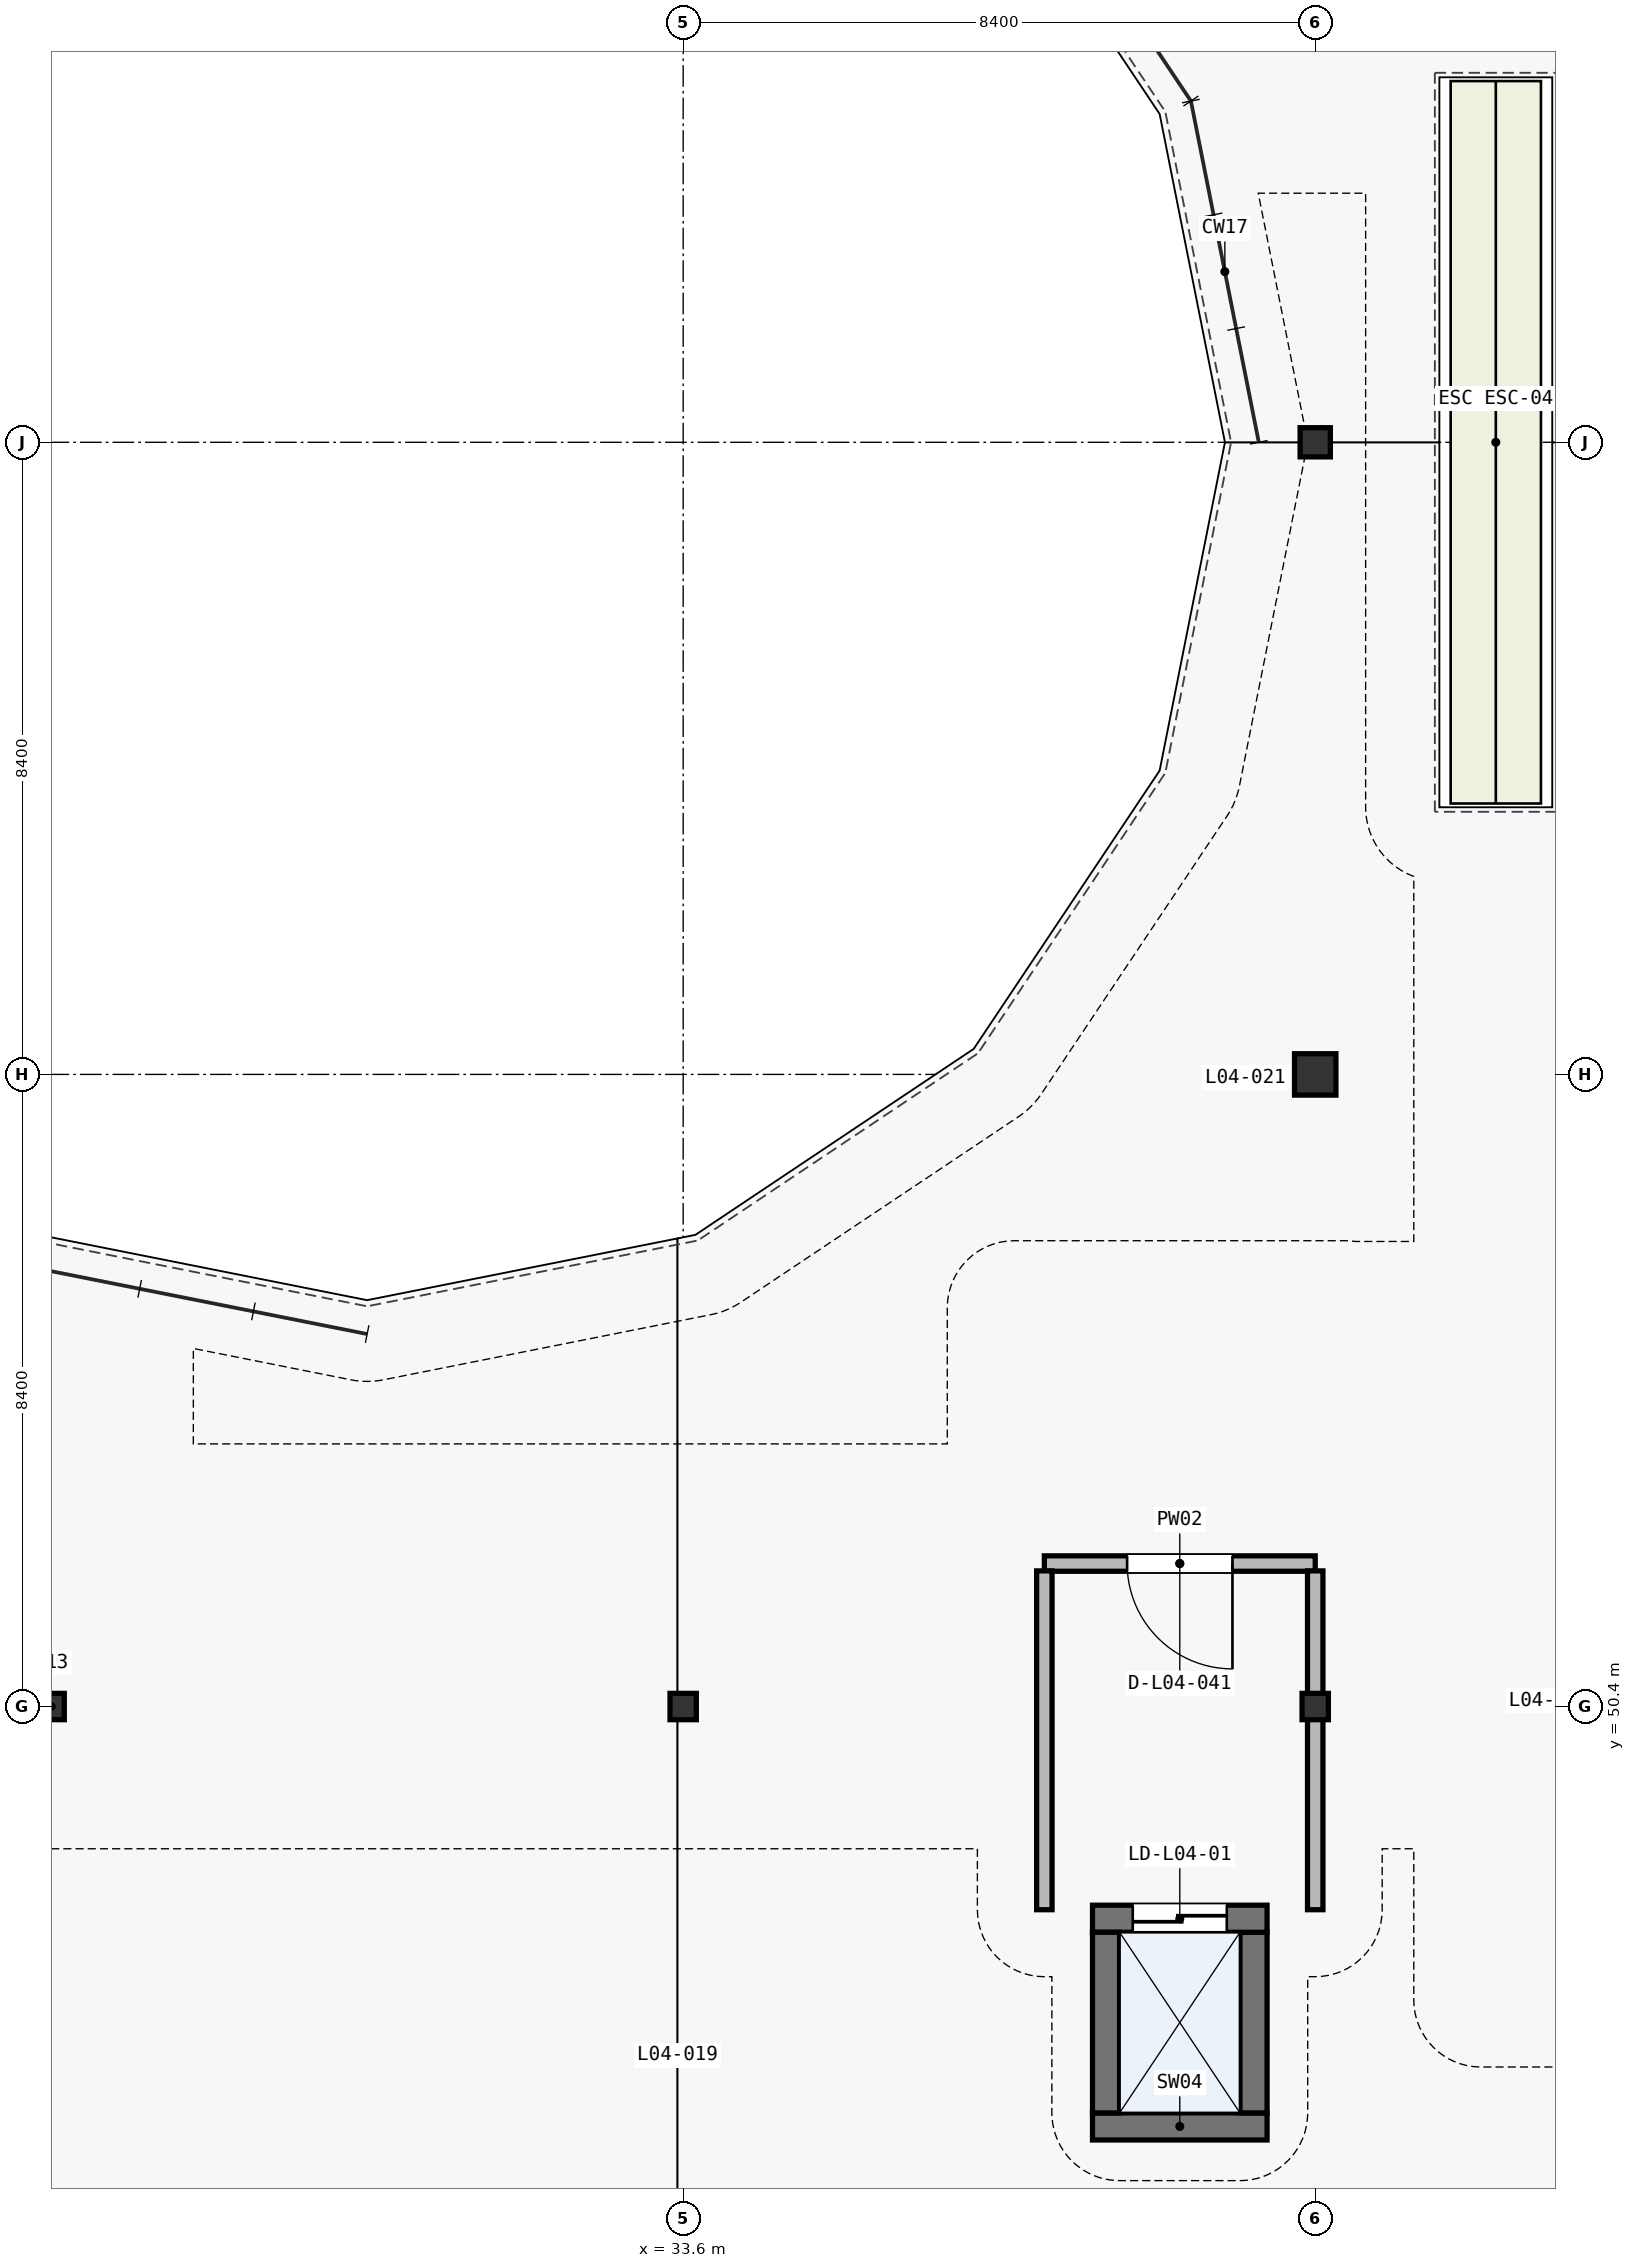
"""IFC4 building model, lengths in metres.
Left out: names, types, materials, properties, quantities, classifications, styles, units other than length and angle.
Written with IfcOpenShell. Run it as: python <this file> out.ifc"""

import sys

from ifc_helpers import new_model, si_unit, direction, frame, frame_2d, origin, origin_2d, place, context, subcontext, project, spatial, rectangle, hollow_rectangle, i_section, extrude, element, fill, save


model = new_model("IFC4")
c1 = context("Model", 3, precision=1e-05, world=origin(), true_north=direction((0.0, 1.0)))
c2 = subcontext(c1, "Body", "Model", "MODEL_VIEW")
j1 = project(units=[si_unit("LENGTHUNIT", "METRE"), si_unit("PLANEANGLEUNIT", "RADIAN")], contexts=[c1])
p1 = place(None, origin())
s1 = spatial("IfcSite", under=j1, at=p1, CompositionType="ELEMENT")
p2 = place(p1, origin())
s2 = spatial("IfcBuilding", under=s1, at=p2, CompositionType="ELEMENT")
p3 = place(p2, frame((0.0, 0.0, 16.5)))
s3 = spatial("IfcBuildingStorey", under=s2, at=p3, CompositionType="ELEMENT", Elevation=16.5)
for number, where, z_axis, x_axis in (
    (1, (25.2, 50.4, 0.0), (0.0, 0.0, 1.0), (1.0, 0.0, 0.0)),
    (2, (33.6, 50.4, 0.0), (0.0, 0.0, 1.0), (1.0, 0.0, 0.0)),
    (3, (42.0, 50.4, 0.0), (0.0, 0.0, 1.0), (1.0, 0.0, 0.0)),
):
    element("IfcColumn", number, at=place(p3, frame(where, z_axis=z_axis, x_axis=x_axis)), inside=s3, PredefinedType="COLUMN", context=c2, shape_type="SweptSolid", body=[
        extrude(i_section(OverallWidth=0.35, OverallDepth=0.35, WebThickness=0.012, FlangeThickness=0.019, FilletRadius=0.02, at=origin_2d()), origin(), (0.0, 0.0, 1.0), 5.1),
    ])
p4 = place(p3, frame((42.0, 58.8, 0.0), z_axis=(0.0, 0.0, 1.0), x_axis=(1.0, 0.0, 0.0)))
e4 = element("IfcColumn", 4, at=p4, inside=s3, PredefinedType="COLUMN", context=c2, shape_type="SweptSolid", body=[
    extrude(hollow_rectangle(XDim=0.55, YDim=0.55, WallThickness=0.022, at=origin_2d()), origin(), (0.0, 0.0, 1.0), 5.1),
])
p5 = place(p3, frame((42.0, 67.2, 0.0), z_axis=(0.0, 0.0, 1.0), x_axis=(1.0, 0.0, 0.0)))
e5 = element("IfcColumn", 5, at=p5, inside=s3, PredefinedType="COLUMN", context=c2, shape_type="SweptSolid", body=[
    extrude(i_section(OverallWidth=0.402, OverallDepth=0.388, WebThickness=0.015, FlangeThickness=0.015, FilletRadius=0.022, at=origin_2d()), origin(), (0.0, 0.0, 1.0), 5.1),
])
p6 = place(p3, frame((39.04, 44.82, 0.0), z_axis=(0.0, 0.0, 1.0), x_axis=(1.0, 0.0, 0.0)))
e6 = element("IfcWall", 6, at=p6, inside=s3, PredefinedType="SHEAR", context=c2, shape_type="SweptSolid", body=[
    extrude(rectangle(XDim=2.32, YDim=0.36, at=frame_2d((1.16, 0.0))), origin(), (0.0, 0.0, 1.0), 4.845),
])
p7 = place(p3, frame((41.18, 45.0, 0.0), z_axis=(0.0, 0.0, 1.0), x_axis=(0.0, 1.0, 0.0)))
e7 = element("IfcWall", 7, at=p7, inside=s3, PredefinedType="SHEAR", context=c2, shape_type="SweptSolid", body=[
    extrude(rectangle(XDim=2.4, YDim=0.36, at=frame_2d((1.2, 0.0))), origin(), (0.0, 0.0, 1.0), 4.845),
])
p8 = place(p3, frame((41.36, 47.58, 0.0), z_axis=(0.0, 0.0, 1.0), x_axis=(-1.0, 0.0, 0.0)))
e8 = element("IfcWall", 8, at=p8, inside=s3, PredefinedType="SHEAR", context=c2, shape_type="SweptSolid", body=[
    extrude(rectangle(XDim=2.32, YDim=0.36, at=frame_2d((1.16, 0.0))), origin(), (0.0, 0.0, 1.0), 4.845),
])
p9 = place(p8, frame((0.535, 0.0, 0.0)))
e9 = element("IfcOpeningElement", 9, at=p9, cuts=e8, PredefinedType="OPENING", context=c2, shape_type="SweptSolid", body=[
    extrude(rectangle(XDim=1.25, YDim=2.2, at=frame_2d((0.625, 1.1))), frame((0.0, 0.19, 0.0), z_axis=(0.0, -1.0, 0.0), x_axis=(1.0, 0.0, 0.0)), (0.0, 0.0, 1.0), 0.38),
])
p10 = place(p3, frame((39.22, 47.4, 0.0), z_axis=(0.0, 0.0, 1.0), x_axis=(0.0, -1.0, 0.0)))
e10 = element("IfcWall", 10, at=p10, inside=s3, PredefinedType="SHEAR", context=c2, shape_type="SweptSolid", body=[
    extrude(rectangle(XDim=2.4, YDim=0.36, at=frame_2d((1.2, 0.0))), origin(), (0.0, 0.0, 1.0), 4.845),
])
p11 = place(p3, frame((42.0, 52.3, 0.0), z_axis=(0.0, 0.0, 1.0), x_axis=(-1.0, 0.0, 0.0)))
e11 = element("IfcWall", 11, at=p11, inside=s3, PredefinedType="PARTITIONING", context=c2, shape_type="SweptSolid", body=[
    extrude(rectangle(XDim=3.6, YDim=0.205, at=frame_2d((1.8, 0.0))), origin(), (0.0, 0.0, 1.0), 4.845),
])
p12 = place(p11, frame((1.1, 0.0, 0.0)))
e12 = element("IfcOpeningElement", 12, at=p12, cuts=e11, PredefinedType="OPENING", context=c2, shape_type="SweptSolid", body=[
    extrude(rectangle(XDim=1.4, YDim=2.15, at=frame_2d((0.7, 1.075))), frame((0.0, 0.113, 0.0), z_axis=(0.0, -1.0, 0.0), x_axis=(1.0, 0.0, 0.0)), (0.0, 0.0, 1.0), 0.225),
])
p13 = place(p3, frame((42.0, 47.7, 0.0), z_axis=(0.0, 0.0, 1.0), x_axis=(0.0, 1.0, 0.0)))
e13 = element("IfcWall", 13, at=p13, inside=s3, PredefinedType="PARTITIONING", context=c2, shape_type="SweptSolid", body=[
    extrude(rectangle(XDim=4.502, YDim=0.205, at=frame_2d((2.251, 0.0))), origin(), (0.0, 0.0, 1.0), 4.145),
])
p14 = place(p3, frame((38.4, 52.202, 0.0), z_axis=(0.0, 0.0, 1.0), x_axis=(0.0, -1.0, 0.0)))
e14 = element("IfcWall", 14, at=p14, inside=s3, PredefinedType="PARTITIONING", context=c2, shape_type="SweptSolid", body=[
    extrude(rectangle(XDim=4.502, YDim=0.205, at=frame_2d((2.251, 0.0))), origin(), (0.0, 0.0, 1.0), 4.845),
])
p15 = place(p9, frame((1.25, 0.0, 0.0), z_axis=(0.0, 0.0, 1.0), x_axis=(-1.0, 0.0, 0.0)))
e15 = element("IfcDoor", 15, at=p15, inside=s3, OperationType="DOUBLE_DOOR_SLIDING", PredefinedType="DOOR", context=c2, shape_type="SweptSolid", body=[
    extrude(rectangle(XDim=1.25, YDim=2.2, at=frame_2d((0.625, 1.1))), frame((0.0, 0.025, 0.0), z_axis=(0.0, -1.0, 0.0), x_axis=(1.0, 0.0, 0.0)), (0.0, 0.0, 1.0), 0.05),
])
fill(e9, e15)
p16 = place(p12, origin())
e16 = element("IfcDoor", 16, at=p16, inside=s3, OperationType="SINGLE_SWING_LEFT", PredefinedType="DOOR", context=c2, shape_type="SweptSolid", body=[
    extrude(rectangle(XDim=1.4, YDim=2.15, at=frame_2d((0.7, 1.075))), frame((0.0, 0.025, 0.0), z_axis=(0.0, -1.0, 0.0), x_axis=(1.0, 0.0, 0.0)), (0.0, 0.0, 1.0), 0.05),
])
fill(e12, e16)
save(model, sys.argv[1])
